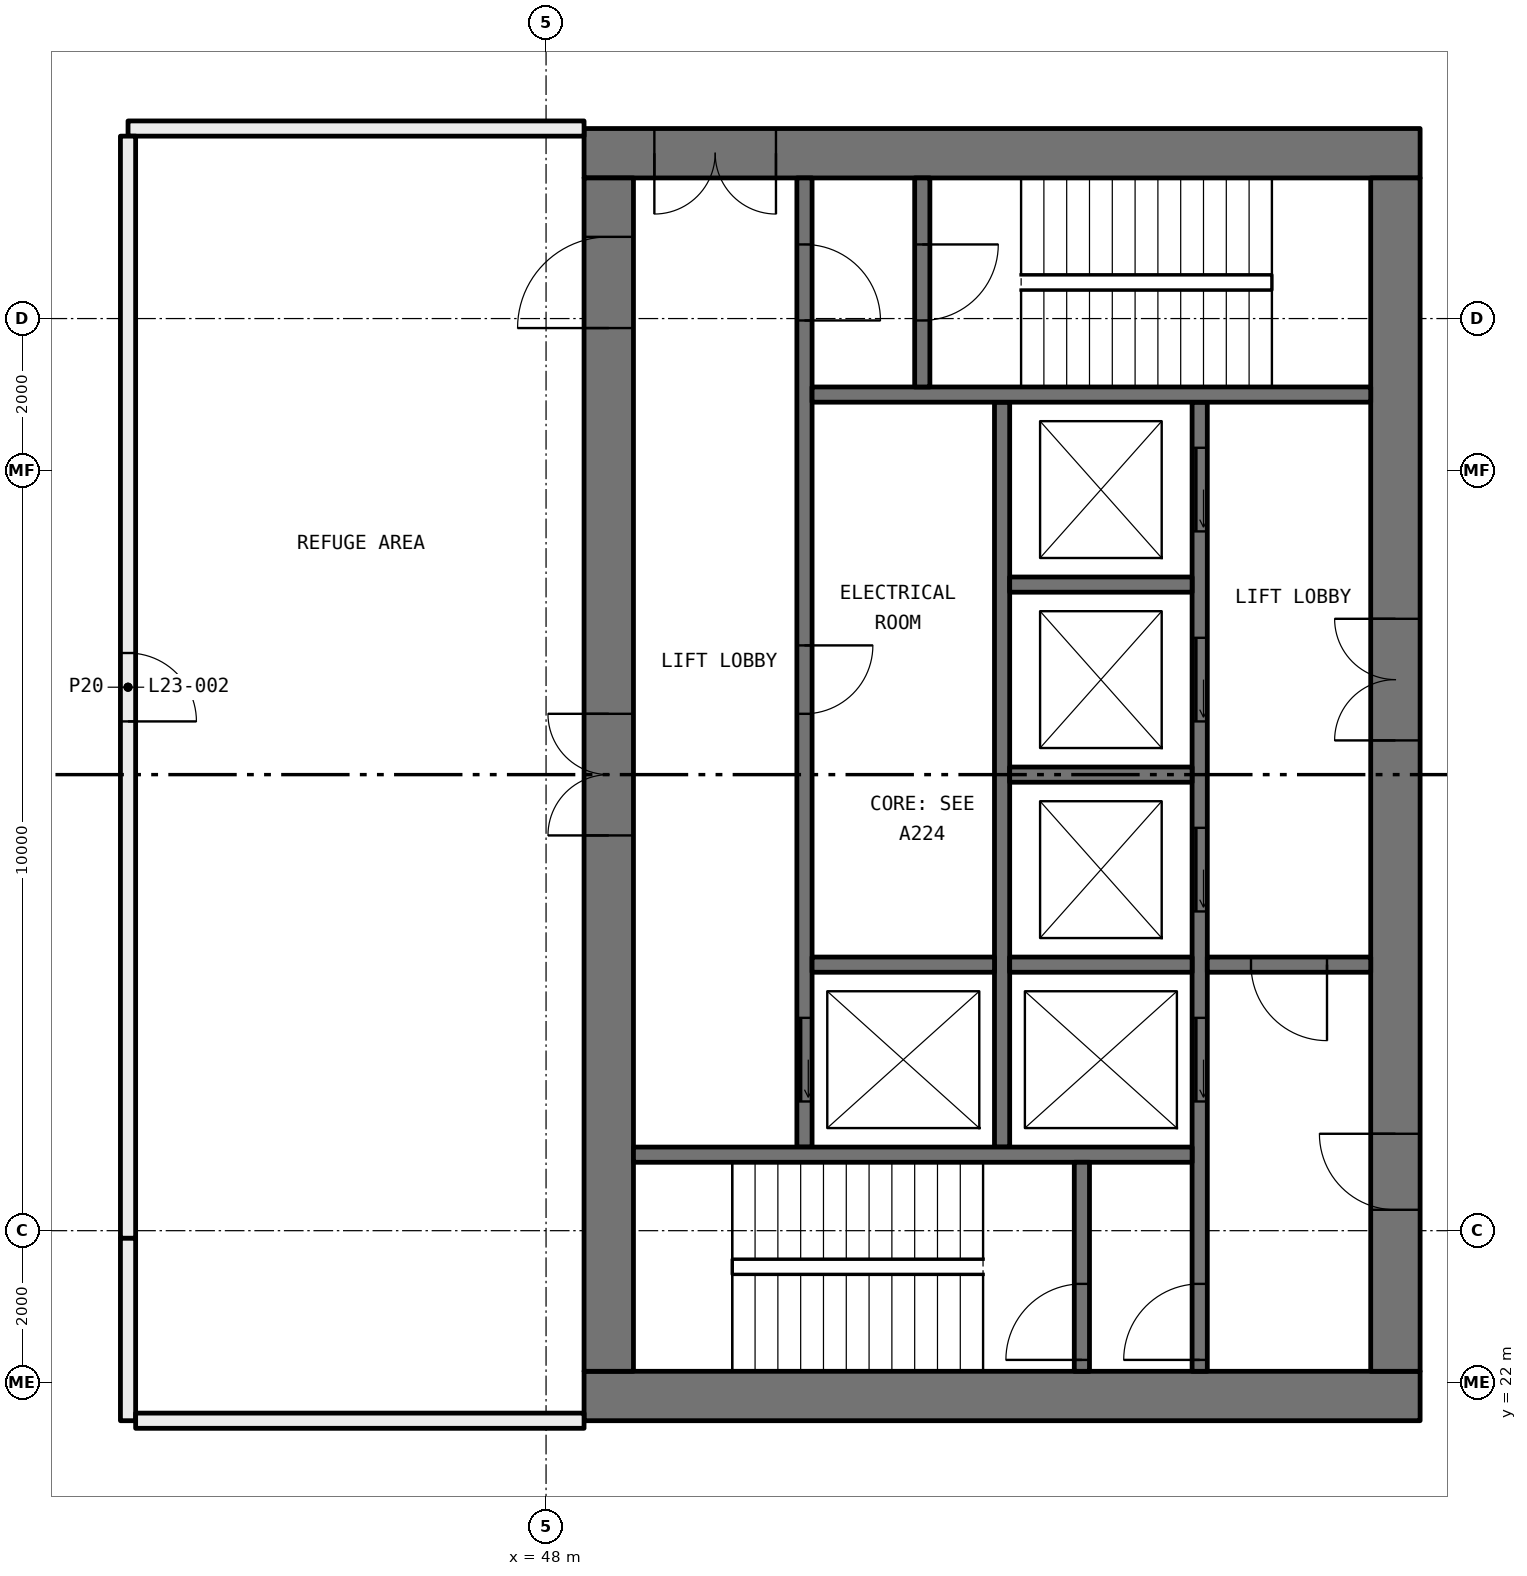
"""IFC4 building model, lengths in metres.
Left out: names, types, materials, properties, quantities, classifications, styles, units other than length and angle.
Written with IfcOpenShell. Run it as: python <this file> out.ifc"""

import sys

from ifc_helpers import new_model, si_unit, direction, frame, frame_2d, origin, place, context, subcontext, project, spatial, rectangle, extrude, element, fill, save


model = new_model("IFC4")
c1 = context("Model", 3, precision=1e-05, world=origin(), true_north=direction((0.0, 1.0)))
c2 = subcontext(c1, "Body", "Model", "MODEL_VIEW")
j1 = project(units=[si_unit("LENGTHUNIT", "METRE"), si_unit("PLANEANGLEUNIT", "RADIAN")], contexts=[c1])
p1 = place(None, origin())
s1 = spatial("IfcSite", under=j1, at=p1, CompositionType="ELEMENT")
p2 = place(p1, origin())
s2 = spatial("IfcBuilding", under=s1, at=p2, CompositionType="ELEMENT")
p3 = place(p2, frame((0.0, 0.0, 92.1)))
s3 = spatial("IfcBuildingStorey", under=s2, at=p3, CompositionType="ELEMENT", Elevation=92.1)
p4 = place(p3, frame((48.5, 38.5, 0.0), z_axis=(0.0, 0.0, 1.0), x_axis=(-1.0, 0.0, 0.0)))
e1 = element("IfcWall", 1, at=p4, inside=s3, PredefinedType="PARTITIONING", context=c2, shape_type="SweptSolid", body=[
    extrude(rectangle(XDim=6.0, YDim=0.2, at=frame_2d((3.0, 0.0))), origin(), (0.0, 0.0, 1.0), 4.1),
])
p5 = place(p3, frame((42.5, 38.4, 0.0), z_axis=(0.0, 0.0, 1.0), x_axis=(0.0, -1.0, 0.0)))
e2 = element("IfcWall", 2, at=p5, inside=s3, PredefinedType="PARTITIONING", context=c2, shape_type="SweptSolid", body=[
    extrude(rectangle(XDim=14.5, YDim=0.2, at=frame_2d((7.25, 0.0))), origin(), (0.0, 0.0, 1.0), 3.5),
])
p6 = place(p5, frame((6.8, 0.0, 0.0)))
e3 = element("IfcOpeningElement", 3, at=p6, cuts=e2, PredefinedType="OPENING", context=c2, shape_type="SweptSolid", body=[
    extrude(rectangle(XDim=0.9, YDim=2.1, at=frame_2d((0.45, 1.05))), frame((0.0, 0.11, 0.0), z_axis=(0.0, -1.0, 0.0), x_axis=(1.0, 0.0, 0.0)), (0.0, 0.0, 1.0), 0.22),
])
p7 = place(p3, frame((42.5, 23.9, 0.0), z_axis=(0.0, 0.0, 1.0), x_axis=(0.0, -1.0, 0.0)))
e4 = element("IfcWall", 4, at=p7, inside=s3, PredefinedType="PARTITIONING", context=c2, shape_type="SweptSolid", body=[
    extrude(rectangle(XDim=2.4, YDim=0.2, at=frame_2d((1.2, 0.0))), origin(), (0.0, 0.0, 1.0), 4.1),
])
p8 = place(p3, frame((42.6, 21.5, 0.0), z_axis=(0.0, 0.0, 1.0), x_axis=(1.0, 0.0, 0.0)))
e5 = element("IfcWall", 5, at=p8, inside=s3, PredefinedType="PARTITIONING", context=c2, shape_type="SweptSolid", body=[
    extrude(rectangle(XDim=5.9, YDim=0.2, at=frame_2d((2.95, 0.0))), origin(), (0.0, 0.0, 1.0), 4.1),
])
p9 = place(p3, frame((59.5, 21.825, 0.0), z_axis=(0.0, 0.0, 1.0), x_axis=(-1.0, 0.0, 0.0)))
e6 = element("IfcWall", 6, at=p9, inside=s3, PredefinedType="SHEAR", context=c2, shape_type="SweptSolid", body=[
    extrude(rectangle(XDim=11.0, YDim=0.65, at=frame_2d((5.5, 0.0))), origin(), (0.0, 0.0, 1.0), 4.1),
])
p10 = place(p3, frame((59.5, 38.175, 0.0), z_axis=(0.0, 0.0, 1.0), x_axis=(-1.0, 0.0, 0.0)))
e7 = element("IfcWall", 7, at=p10, inside=s3, PredefinedType="SHEAR", context=c2, shape_type="SweptSolid", body=[
    extrude(rectangle(XDim=11.0, YDim=0.65, at=frame_2d((5.5, 0.0))), origin(), (0.0, 0.0, 1.0), 4.1),
])
p11 = place(p10, frame((8.475, 0.0, 0.0)))
e8 = element("IfcOpeningElement", 8, at=p11, cuts=e7, PredefinedType="OPENING", context=c2, shape_type="SweptSolid", body=[
    extrude(rectangle(XDim=1.6, YDim=2.1, at=frame_2d((0.8, 1.05))), frame((0.0, 0.335, 0.0), z_axis=(0.0, -1.0, 0.0), x_axis=(1.0, 0.0, 0.0)), (0.0, 0.0, 1.0), 0.67),
])
p12 = place(p3, frame((59.175, 22.15, 0.0), z_axis=(0.0, 0.0, 1.0), x_axis=(0.0, 1.0, 0.0)))
e9 = element("IfcWall", 9, at=p12, inside=s3, PredefinedType="SHEAR", context=c2, shape_type="SweptSolid", body=[
    extrude(rectangle(XDim=15.7, YDim=0.65, at=frame_2d((7.85, 0.0))), origin(), (0.0, 0.0, 1.0), 4.1),
])
p13 = place(p12, frame((8.3, 0.0, 0.0)))
e10 = element("IfcOpeningElement", 10, at=p13, cuts=e9, PredefinedType="OPENING", context=c2, shape_type="SweptSolid", body=[
    extrude(rectangle(XDim=1.6, YDim=2.1, at=frame_2d((0.8, 1.05))), frame((0.0, 0.335, 0.0), z_axis=(0.0, -1.0, 0.0), x_axis=(1.0, 0.0, 0.0)), (0.0, 0.0, 1.0), 0.67),
])
p14 = place(p12, frame((2.125, 0.0, 0.0)))
e11 = element("IfcOpeningElement", 11, at=p14, cuts=e9, PredefinedType="OPENING", context=c2, shape_type="SweptSolid", body=[
    extrude(rectangle(XDim=1.0, YDim=2.1, at=frame_2d((0.5, 1.05))), frame((0.0, 0.335, 0.0), z_axis=(0.0, -1.0, 0.0), x_axis=(1.0, 0.0, 0.0)), (0.0, 0.0, 1.0), 0.67),
])
p15 = place(p3, frame((48.825, 22.15, 0.0), z_axis=(0.0, 0.0, 1.0), x_axis=(0.0, 1.0, 0.0)))
e12 = element("IfcWall", 12, at=p15, inside=s3, PredefinedType="SHEAR", context=c2, shape_type="SweptSolid", body=[
    extrude(rectangle(XDim=15.7, YDim=0.65, at=frame_2d((7.85, 0.0))), origin(), (0.0, 0.0, 1.0), 4.1),
])
p16 = place(p15, frame((7.05, 0.0, 0.0)))
e13 = element("IfcOpeningElement", 13, at=p16, cuts=e12, PredefinedType="OPENING", context=c2, shape_type="SweptSolid", body=[
    extrude(rectangle(XDim=1.6, YDim=2.1, at=frame_2d((0.8, 1.05))), frame((0.0, 0.335, 0.0), z_axis=(0.0, -1.0, 0.0), x_axis=(1.0, 0.0, 0.0)), (0.0, 0.0, 1.0), 0.67),
])
p17 = place(p15, frame((13.725, 0.0, 0.0)))
e14 = element("IfcOpeningElement", 14, at=p17, cuts=e12, PredefinedType="OPENING", context=c2, shape_type="SweptSolid", body=[
    extrude(rectangle(XDim=1.2, YDim=2.1, at=frame_2d((0.6, 1.05))), frame((0.0, 0.335, 0.0), z_axis=(0.0, -1.0, 0.0), x_axis=(1.0, 0.0, 0.0)), (0.0, 0.0, 1.0), 0.67),
])
p18 = place(p3, frame((56.6, 22.15, 0.0), z_axis=(0.0, 0.0, 1.0), x_axis=(0.0, 1.0, 0.0)))
e15 = element("IfcWall", 15, at=p18, inside=s3, PredefinedType="SOLIDWALL", context=c2, shape_type="SweptSolid", body=[
    extrude(rectangle(XDim=12.75, YDim=0.2, at=frame_2d((6.375, 0.0))), origin(), (0.0, 0.0, 1.0), 4.1),
])
p19 = place(p18, frame((3.55, 0.0, 0.0)))
e16 = element("IfcOpeningElement", 16, at=p19, cuts=e15, PredefinedType="OPENING", context=c2, shape_type="SweptSolid", body=[
    extrude(rectangle(XDim=1.1, YDim=2.1, at=frame_2d((0.55, 1.05))), frame((0.0, 0.11, 0.0), z_axis=(0.0, -1.0, 0.0), x_axis=(1.0, 0.0, 0.0)), (0.0, 0.0, 1.0), 0.22),
])
p20 = place(p18, frame((6.05, 0.0, 0.0)))
e17 = element("IfcOpeningElement", 17, at=p20, cuts=e15, PredefinedType="OPENING", context=c2, shape_type="SweptSolid", body=[
    extrude(rectangle(XDim=1.1, YDim=2.1, at=frame_2d((0.55, 1.05))), frame((0.0, 0.11, 0.0), z_axis=(0.0, -1.0, 0.0), x_axis=(1.0, 0.0, 0.0)), (0.0, 0.0, 1.0), 0.22),
])
p21 = place(p18, frame((8.55, 0.0, 0.0)))
e18 = element("IfcOpeningElement", 18, at=p21, cuts=e15, PredefinedType="OPENING", context=c2, shape_type="SweptSolid", body=[
    extrude(rectangle(XDim=1.1, YDim=2.1, at=frame_2d((0.55, 1.05))), frame((0.0, 0.11, 0.0), z_axis=(0.0, -1.0, 0.0), x_axis=(1.0, 0.0, 0.0)), (0.0, 0.0, 1.0), 0.22),
])
p22 = place(p18, frame((11.05, 0.0, 0.0)))
e19 = element("IfcOpeningElement", 19, at=p22, cuts=e15, PredefinedType="OPENING", context=c2, shape_type="SweptSolid", body=[
    extrude(rectangle(XDim=1.1, YDim=2.1, at=frame_2d((0.55, 1.05))), frame((0.0, 0.11, 0.0), z_axis=(0.0, -1.0, 0.0), x_axis=(1.0, 0.0, 0.0)), (0.0, 0.0, 1.0), 0.22),
])
p23 = place(p18, frame((0.15, 0.0, 0.0)))
e20 = element("IfcOpeningElement", 20, at=p23, cuts=e15, PredefinedType="OPENING", context=c2, shape_type="SweptSolid", body=[
    extrude(rectangle(XDim=1.0, YDim=2.1, at=frame_2d((0.5, 1.05))), frame((0.0, 0.11, 0.0), z_axis=(0.0, -1.0, 0.0), x_axis=(1.0, 0.0, 0.0)), (0.0, 0.0, 1.0), 0.22),
])
p24 = place(p3, frame((51.4, 25.1, 0.0), z_axis=(0.0, 0.0, 1.0), x_axis=(0.0, 1.0, 0.0)))
e21 = element("IfcWall", 21, at=p24, inside=s3, PredefinedType="SOLIDWALL", context=c2, shape_type="SweptSolid", body=[
    extrude(rectangle(XDim=12.75, YDim=0.2, at=frame_2d((6.375, 0.0))), origin(), (0.0, 0.0, 1.0), 4.1),
])
p25 = place(p24, frame((0.6, 0.0, 0.0)))
e22 = element("IfcOpeningElement", 22, at=p25, cuts=e21, PredefinedType="OPENING", context=c2, shape_type="SweptSolid", body=[
    extrude(rectangle(XDim=1.1, YDim=2.1, at=frame_2d((0.55, 1.05))), frame((0.0, 0.11, 0.0), z_axis=(0.0, -1.0, 0.0), x_axis=(1.0, 0.0, 0.0)), (0.0, 0.0, 1.0), 0.22),
])
p26 = place(p24, frame((10.875, 0.0, 0.0)))
e23 = element("IfcOpeningElement", 23, at=p26, cuts=e21, PredefinedType="OPENING", context=c2, shape_type="SweptSolid", body=[
    extrude(rectangle(XDim=1.0, YDim=2.1, at=frame_2d((0.5, 1.05))), frame((0.0, 0.11, 0.0), z_axis=(0.0, -1.0, 0.0), x_axis=(1.0, 0.0, 0.0)), (0.0, 0.0, 1.0), 0.22),
])
p27 = place(p24, frame((5.7, 0.0, 0.0)))
e24 = element("IfcOpeningElement", 24, at=p27, cuts=e21, PredefinedType="OPENING", context=c2, shape_type="SweptSolid", body=[
    extrude(rectangle(XDim=0.9, YDim=2.1, at=frame_2d((0.45, 1.05))), frame((0.0, 0.11, 0.0), z_axis=(0.0, -1.0, 0.0), x_axis=(1.0, 0.0, 0.0)), (0.0, 0.0, 1.0), 0.22),
])
p28 = place(p3, frame((54.0, 25.1, 0.0), z_axis=(0.0, 0.0, 1.0), x_axis=(0.0, 1.0, 0.0)))
e25 = element("IfcWall", 25, at=p28, inside=s3, PredefinedType="SOLIDWALL", context=c2, shape_type="SweptSolid", body=[
    extrude(rectangle(XDim=9.8, YDim=0.2, at=frame_2d((4.9, 0.0))), origin(), (0.0, 0.0, 1.0), 4.1),
])
for number, where, z_axis, x_axis in (
    (26, (56.5, 25.0, 0.0), (0.0, 0.0, 1.0), (-1.0, 0.0, 0.0)),
    (27, (58.85, 35.0, 0.0), (0.0, 0.0, 1.0), (-1.0, 0.0, 0.0)),
):
    element("IfcWall", number, at=place(p3, frame(where, z_axis=z_axis, x_axis=x_axis)), inside=s3, PredefinedType="SOLIDWALL", context=c2, shape_type="SweptSolid", body=[
        extrude(rectangle(XDim=7.35, YDim=0.2, at=frame_2d((3.675, 0.0))), origin(), (0.0, 0.0, 1.0), 4.1),
    ])
p29 = place(p3, frame((58.85, 27.5, 0.0), z_axis=(0.0, 0.0, 1.0), x_axis=(-1.0, 0.0, 0.0)))
e28 = element("IfcWall", 28, at=p29, inside=s3, PredefinedType="SOLIDWALL", context=c2, shape_type="SweptSolid", body=[
    extrude(rectangle(XDim=2.15, YDim=0.2, at=frame_2d((1.075, 0.0))), origin(), (0.0, 0.0, 1.0), 4.1),
])
p30 = place(p29, frame((0.575, 0.0, 0.0)))
e29 = element("IfcOpeningElement", 29, at=p30, cuts=e28, PredefinedType="OPENING", context=c2, shape_type="SweptSolid", body=[
    extrude(rectangle(XDim=1.0, YDim=2.1, at=frame_2d((0.5, 1.05))), frame((0.0, 0.11, 0.0), z_axis=(0.0, -1.0, 0.0), x_axis=(1.0, 0.0, 0.0)), (0.0, 0.0, 1.0), 0.22),
])
p31 = place(p3, frame((55.05, 22.15, 0.0), z_axis=(0.0, 0.0, 1.0), x_axis=(0.0, 1.0, 0.0)))
e30 = element("IfcWall", 30, at=p31, inside=s3, PredefinedType="SOLIDWALL", context=c2, shape_type="SweptSolid", body=[
    extrude(rectangle(XDim=2.75, YDim=0.2, at=frame_2d((1.375, 0.0))), origin(), (0.0, 0.0, 1.0), 4.1),
])
p32 = place(p31, frame((0.15, 0.0, 0.0)))
e31 = element("IfcOpeningElement", 31, at=p32, cuts=e30, PredefinedType="OPENING", context=c2, shape_type="SweptSolid", body=[
    extrude(rectangle(XDim=1.0, YDim=2.1, at=frame_2d((0.5, 1.05))), frame((0.0, 0.11, 0.0), z_axis=(0.0, -1.0, 0.0), x_axis=(1.0, 0.0, 0.0)), (0.0, 0.0, 1.0), 0.22),
])
p33 = place(p3, frame((52.95, 35.1, 0.0), z_axis=(0.0, 0.0, 1.0), x_axis=(0.0, 1.0, 0.0)))
e32 = element("IfcWall", 32, at=p33, inside=s3, PredefinedType="SOLIDWALL", context=c2, shape_type="SweptSolid", body=[
    extrude(rectangle(XDim=2.75, YDim=0.2, at=frame_2d((1.375, 0.0))), origin(), (0.0, 0.0, 1.0), 4.1),
])
p34 = place(p33, frame((0.875, 0.0, 0.0)))
e33 = element("IfcOpeningElement", 33, at=p34, cuts=e32, PredefinedType="OPENING", context=c2, shape_type="SweptSolid", body=[
    extrude(rectangle(XDim=1.0, YDim=2.1, at=frame_2d((0.5, 1.05))), frame((0.0, 0.11, 0.0), z_axis=(0.0, -1.0, 0.0), x_axis=(1.0, 0.0, 0.0)), (0.0, 0.0, 1.0), 0.22),
])
for number, where, z_axis, x_axis in (
    (34, (56.5, 27.5, 0.0), (0.0, 0.0, 1.0), (-1.0, 0.0, 0.0)),
    (35, (56.5, 30.0, 0.0), (0.0, 0.0, 1.0), (-1.0, 0.0, 0.0)),
    (36, (56.5, 32.5, 0.0), (0.0, 0.0, 1.0), (-1.0, 0.0, 0.0)),
    (37, (53.9, 27.5, 0.0), (0.0, 0.0, 1.0), (-1.0, 0.0, 0.0)),
):
    element("IfcWall", number, at=place(p3, frame(where, z_axis=z_axis, x_axis=x_axis)), inside=s3, PredefinedType="SOLIDWALL", context=c2, shape_type="SweptSolid", body=[
        extrude(rectangle(XDim=2.4, YDim=0.2, at=frame_2d((1.2, 0.0))), origin(), (0.0, 0.0, 1.0), 4.1),
    ])
p35 = place(p6, origin())
e38 = element("IfcDoor", 38, at=p35, inside=s3, OperationType="SINGLE_SWING_LEFT", PredefinedType="DOOR", context=c2, shape_type="SweptSolid", body=[
    extrude(rectangle(XDim=0.9, YDim=2.1, at=frame_2d((0.45, 1.05))), frame((0.0, 0.025, 0.0), z_axis=(0.0, -1.0, 0.0), x_axis=(1.0, 0.0, 0.0)), (0.0, 0.0, 1.0), 0.05),
])
fill(e3, e38)
p36 = place(p25, origin())
e39 = element("IfcDoor", 39, at=p36, inside=s3, OperationType="SLIDING_TO_LEFT", PredefinedType="DOOR", context=c2, shape_type="SweptSolid", body=[
    extrude(rectangle(XDim=1.1, YDim=2.1, at=frame_2d((0.55, 1.05))), frame((0.0, 0.025, 0.0), z_axis=(0.0, -1.0, 0.0), x_axis=(1.0, 0.0, 0.0)), (0.0, 0.0, 1.0), 0.05),
])
fill(e22, e39)
p37 = place(p19, origin())
e40 = element("IfcDoor", 40, at=p37, inside=s3, OperationType="SLIDING_TO_LEFT", PredefinedType="DOOR", context=c2, shape_type="SweptSolid", body=[
    extrude(rectangle(XDim=1.1, YDim=2.1, at=frame_2d((0.55, 1.05))), frame((0.0, 0.025, 0.0), z_axis=(0.0, -1.0, 0.0), x_axis=(1.0, 0.0, 0.0)), (0.0, 0.0, 1.0), 0.05),
])
fill(e16, e40)
p38 = place(p20, origin())
e41 = element("IfcDoor", 41, at=p38, inside=s3, OperationType="SLIDING_TO_LEFT", PredefinedType="DOOR", context=c2, shape_type="SweptSolid", body=[
    extrude(rectangle(XDim=1.1, YDim=2.1, at=frame_2d((0.55, 1.05))), frame((0.0, 0.025, 0.0), z_axis=(0.0, -1.0, 0.0), x_axis=(1.0, 0.0, 0.0)), (0.0, 0.0, 1.0), 0.05),
])
fill(e17, e41)
p39 = place(p21, origin())
e42 = element("IfcDoor", 42, at=p39, inside=s3, OperationType="SLIDING_TO_LEFT", PredefinedType="DOOR", context=c2, shape_type="SweptSolid", body=[
    extrude(rectangle(XDim=1.1, YDim=2.1, at=frame_2d((0.55, 1.05))), frame((0.0, 0.025, 0.0), z_axis=(0.0, -1.0, 0.0), x_axis=(1.0, 0.0, 0.0)), (0.0, 0.0, 1.0), 0.05),
])
fill(e18, e42)
p40 = place(p22, origin())
e43 = element("IfcDoor", 43, at=p40, inside=s3, OperationType="SLIDING_TO_LEFT", PredefinedType="DOOR", context=c2, shape_type="SweptSolid", body=[
    extrude(rectangle(XDim=1.1, YDim=2.1, at=frame_2d((0.55, 1.05))), frame((0.0, 0.025, 0.0), z_axis=(0.0, -1.0, 0.0), x_axis=(1.0, 0.0, 0.0)), (0.0, 0.0, 1.0), 0.05),
])
fill(e19, e43)
p41 = place(p32, origin())
e44 = element("IfcDoor", 44, at=p41, inside=s3, OperationType="SINGLE_SWING_RIGHT", PredefinedType="DOOR", context=c2, shape_type="SweptSolid", body=[
    extrude(rectangle(XDim=1.0, YDim=2.1, at=frame_2d((0.5, 1.05))), frame((0.0, 0.025, 0.0), z_axis=(0.0, -1.0, 0.0), x_axis=(1.0, 0.0, 0.0)), (0.0, 0.0, 1.0), 0.05),
])
fill(e31, e44)
p42 = place(p23, origin())
e45 = element("IfcDoor", 45, at=p42, inside=s3, OperationType="SINGLE_SWING_RIGHT", PredefinedType="DOOR", context=c2, shape_type="SweptSolid", body=[
    extrude(rectangle(XDim=1.0, YDim=2.1, at=frame_2d((0.5, 1.05))), frame((0.0, 0.025, 0.0), z_axis=(0.0, -1.0, 0.0), x_axis=(1.0, 0.0, 0.0)), (0.0, 0.0, 1.0), 0.05),
])
fill(e20, e45)
p43 = place(p26, frame((1.0, 0.0, 0.0), x_axis=(-1.0, 0.0, 0.0)))
e46 = element("IfcDoor", 46, at=p43, inside=s3, OperationType="SINGLE_SWING_LEFT", PredefinedType="DOOR", context=c2, shape_type="SweptSolid", body=[
    extrude(rectangle(XDim=1.0, YDim=2.1, at=frame_2d((0.5, 1.05))), frame((0.0, 0.025, 0.0), z_axis=(0.0, -1.0, 0.0), x_axis=(1.0, 0.0, 0.0)), (0.0, 0.0, 1.0), 0.05),
])
fill(e23, e46)
p44 = place(p34, frame((1.0, 0.0, 0.0), x_axis=(-1.0, 0.0, 0.0)))
e47 = element("IfcDoor", 47, at=p44, inside=s3, OperationType="SINGLE_SWING_RIGHT", PredefinedType="DOOR", context=c2, shape_type="SweptSolid", body=[
    extrude(rectangle(XDim=1.0, YDim=2.1, at=frame_2d((0.5, 1.05))), frame((0.0, 0.025, 0.0), z_axis=(0.0, -1.0, 0.0), x_axis=(1.0, 0.0, 0.0)), (0.0, 0.0, 1.0), 0.05),
])
fill(e33, e47)
p45 = place(p30, origin())
e48 = element("IfcDoor", 48, at=p45, inside=s3, OperationType="SINGLE_SWING_RIGHT", PredefinedType="DOOR", context=c2, shape_type="SweptSolid", body=[
    extrude(rectangle(XDim=1.0, YDim=2.1, at=frame_2d((0.5, 1.05))), frame((0.0, 0.025, 0.0), z_axis=(0.0, -1.0, 0.0), x_axis=(1.0, 0.0, 0.0)), (0.0, 0.0, 1.0), 0.05),
])
fill(e29, e48)
p46 = place(p13, origin())
e49 = element("IfcDoor", 49, at=p46, inside=s3, OperationType="DOUBLE_DOOR_SINGLE_SWING", PredefinedType="DOOR", context=c2, shape_type="SweptSolid", body=[
    extrude(rectangle(XDim=1.6, YDim=2.1, at=frame_2d((0.8, 1.05))), frame((0.0, 0.025, 0.0), z_axis=(0.0, -1.0, 0.0), x_axis=(1.0, 0.0, 0.0)), (0.0, 0.0, 1.0), 0.05),
])
fill(e10, e49)
p47 = place(p14, origin())
e50 = element("IfcDoor", 50, at=p47, inside=s3, OperationType="SINGLE_SWING_LEFT", PredefinedType="DOOR", context=c2, shape_type="SweptSolid", body=[
    extrude(rectangle(XDim=1.0, YDim=2.1, at=frame_2d((0.5, 1.05))), frame((0.0, 0.025, 0.0), z_axis=(0.0, -1.0, 0.0), x_axis=(1.0, 0.0, 0.0)), (0.0, 0.0, 1.0), 0.05),
])
fill(e11, e50)
p48 = place(p11, origin())
e51 = element("IfcDoor", 51, at=p48, inside=s3, OperationType="DOUBLE_DOOR_SINGLE_SWING", PredefinedType="DOOR", context=c2, shape_type="SweptSolid", body=[
    extrude(rectangle(XDim=1.6, YDim=2.1, at=frame_2d((0.8, 1.05))), frame((0.0, 0.025, 0.0), z_axis=(0.0, -1.0, 0.0), x_axis=(1.0, 0.0, 0.0)), (0.0, 0.0, 1.0), 0.05),
])
fill(e8, e51)
p49 = place(p16, origin())
e52 = element("IfcDoor", 52, at=p49, inside=s3, OperationType="DOUBLE_DOOR_SINGLE_SWING", PredefinedType="DOOR", context=c2, shape_type="SweptSolid", body=[
    extrude(rectangle(XDim=1.6, YDim=2.1, at=frame_2d((0.8, 1.05))), frame((0.0, 0.025, 0.0), z_axis=(0.0, -1.0, 0.0), x_axis=(1.0, 0.0, 0.0)), (0.0, 0.0, 1.0), 0.05),
])
fill(e13, e52)
p50 = place(p17, origin())
e53 = element("IfcDoor", 53, at=p50, inside=s3, OperationType="SINGLE_SWING_RIGHT", PredefinedType="DOOR", context=c2, shape_type="SweptSolid", body=[
    extrude(rectangle(XDim=1.2, YDim=2.1, at=frame_2d((0.6, 1.05))), frame((0.0, 0.025, 0.0), z_axis=(0.0, -1.0, 0.0), x_axis=(1.0, 0.0, 0.0)), (0.0, 0.0, 1.0), 0.05),
])
fill(e14, e53)
p51 = place(p27, frame((0.9, 0.0, 0.0), x_axis=(-1.0, 0.0, 0.0)))
e54 = element("IfcDoor", 54, at=p51, inside=s3, OperationType="SINGLE_SWING_RIGHT", PredefinedType="DOOR", context=c2, shape_type="SweptSolid", body=[
    extrude(rectangle(XDim=0.9, YDim=2.1, at=frame_2d((0.45, 1.05))), frame((0.0, 0.025, 0.0), z_axis=(0.0, -1.0, 0.0), x_axis=(1.0, 0.0, 0.0)), (0.0, 0.0, 1.0), 0.05),
])
fill(e24, e54)
save(model, sys.argv[1])
